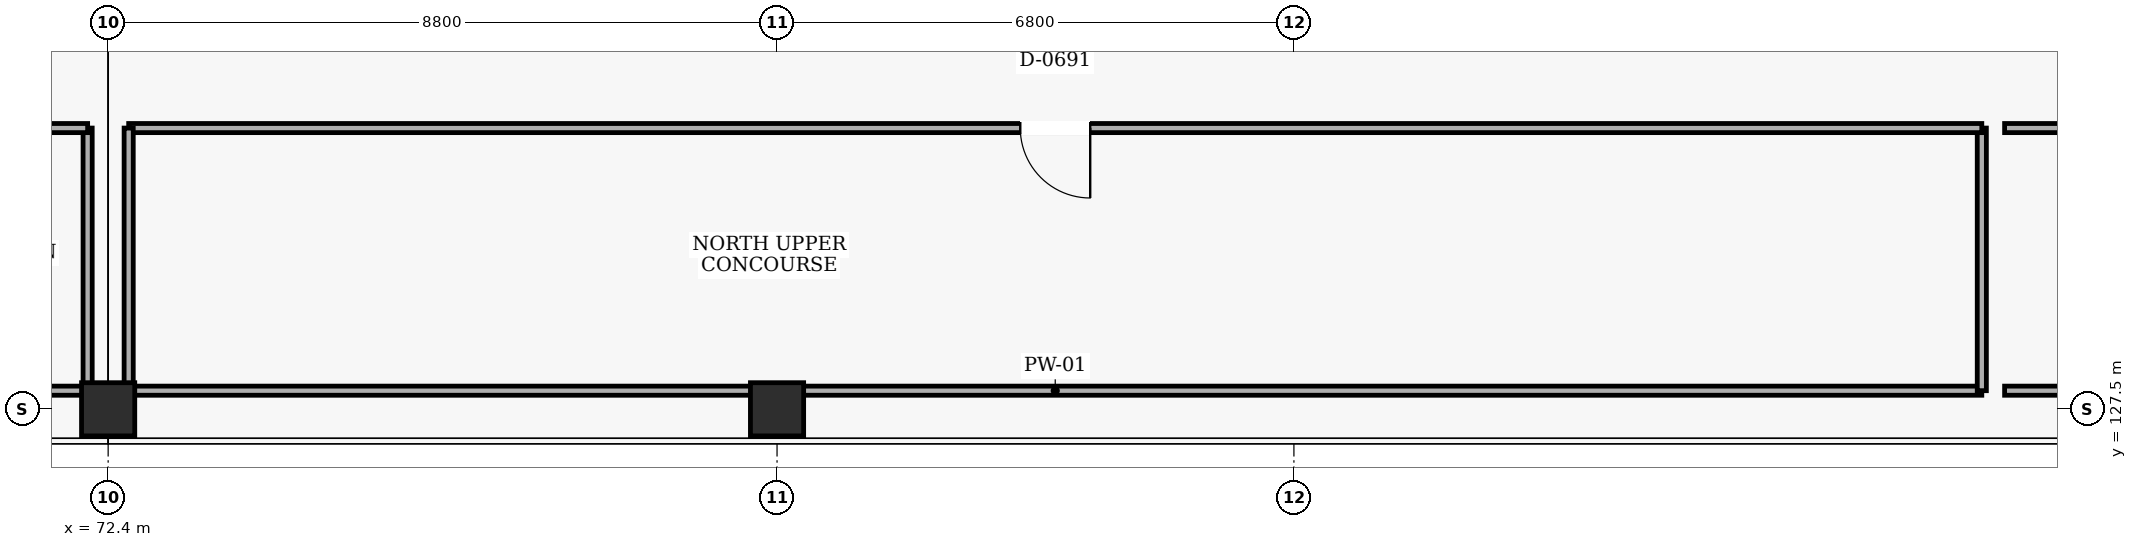
"""IFC4 building model, lengths in metres.
Left out: names, types, materials, properties, quantities, classifications, styles, units other than length and angle.
Written with IfcOpenShell. Run it as: python <this file> out.ifc"""

import sys

from ifc_helpers import new_model, si_unit, direction, frame, frame_2d, origin, origin_2d, place, context, subcontext, project, spatial, rectangle, extrude, element, fill, save


model = new_model("IFC4")
c1 = context("Model", 3, precision=1e-05, world=origin(), true_north=direction((0.0, 1.0)))
c2 = subcontext(c1, "Body", "Model", "MODEL_VIEW")
j1 = project(units=[si_unit("LENGTHUNIT", "METRE"), si_unit("PLANEANGLEUNIT", "RADIAN")], contexts=[c1])
p1 = place(None, origin())
s1 = spatial("IfcSite", under=j1, at=p1, CompositionType="ELEMENT")
p2 = place(p1, origin())
s2 = spatial("IfcBuilding", under=s1, at=p2, CompositionType="ELEMENT")
p3 = place(p2, frame((0.0, 0.0, 15.0)))
s3 = spatial("IfcBuildingStorey", under=s2, at=p3, CompositionType="ELEMENT", Elevation=15.0)
for number, where, z_axis, x_axis in (
    (1, (72.4, 127.5, 0.0), (0.0, 0.0, 1.0), (1.0, 0.0, 0.0)),
    (2, (81.2, 127.5, 0.0), (0.0, 0.0, 1.0), (1.0, 0.0, 0.0)),
):
    element("IfcColumn", number, at=place(p3, frame(where, z_axis=z_axis, x_axis=x_axis)), inside=s3, PredefinedType="COLUMN", context=c2, shape_type="SweptSolid", body=[
        extrude(rectangle(XDim=0.7, YDim=0.7, at=origin_2d()), origin(), (0.0, 0.0, 1.0), 4.8),
    ])
p4 = place(p3, frame((56.618, 127.745, 0.0), z_axis=(0.0, 0.0, 1.0), x_axis=(1.0, 0.0, 0.0)))
e3 = element("IfcWall", 3, at=p4, inside=s3, PredefinedType="PARTITIONING", context=c2, shape_type="SweptSolid", body=[
    extrude(rectangle(XDim=15.511, YDim=0.12, at=frame_2d((7.756, 0.0))), origin(), (0.0, 0.0, 1.0), 3.78),
])
p5 = place(p3, frame((72.13, 127.745, 0.0), z_axis=(0.0, 0.0, 1.0), x_axis=(0.0, 1.0, 0.0)))
e4 = element("IfcWall", 4, at=p5, inside=s3, PredefinedType="PARTITIONING", context=c2, shape_type="SweptSolid", body=[
    extrude(rectangle(XDim=3.455, YDim=0.12, at=frame_2d((1.728, 0.0))), origin(), (0.0, 0.0, 1.0), 3.78),
])
p6 = place(p3, frame((72.13, 131.2, 0.0), z_axis=(0.0, 0.0, 1.0), x_axis=(-1.0, 0.0, 0.0)))
e5 = element("IfcWall", 5, at=p6, inside=s3, PredefinedType="PARTITIONING", context=c2, shape_type="SweptSolid", body=[
    extrude(rectangle(XDim=15.511, YDim=0.12, at=frame_2d((7.756, 0.0))), origin(), (0.0, 0.0, 1.0), 4.5),
])
p7 = place(p6, frame((6.676, 0.0, 0.0)))
e6 = element("IfcOpeningElement", 6, at=p7, cuts=e5, PredefinedType="OPENING", context=c2, shape_type="SweptSolid", body=[
    extrude(rectangle(XDim=2.16, YDim=2.35, at=frame_2d((1.08, 1.175))), frame((0.0, 0.07, 0.0), z_axis=(0.0, -1.0, 0.0), x_axis=(1.0, 0.0, 0.0)), (0.0, 0.0, 1.0), 0.14),
])
p8 = place(p3, frame((72.67, 127.745, 0.0), z_axis=(0.0, 0.0, 1.0), x_axis=(1.0, 0.0, 0.0)))
e7 = element("IfcWall", 7, at=p8, inside=s3, PredefinedType="PARTITIONING", context=c2, shape_type="SweptSolid", body=[
    extrude(rectangle(XDim=24.38, YDim=0.12, at=frame_2d((12.19, 0.0))), origin(), (0.0, 0.0, 1.0), 3.78),
])
p9 = place(p3, frame((97.05, 127.745, 0.0), z_axis=(0.0, 0.0, 1.0), x_axis=(0.0, 1.0, 0.0)))
e8 = element("IfcWall", 8, at=p9, inside=s3, PredefinedType="PARTITIONING", context=c2, shape_type="SweptSolid", body=[
    extrude(rectangle(XDim=3.455, YDim=0.12, at=frame_2d((1.728, 0.0))), origin(), (0.0, 0.0, 1.0), 4.5),
])
p10 = place(p3, frame((97.05, 131.2, 0.0), z_axis=(0.0, 0.0, 1.0), x_axis=(-1.0, 0.0, 0.0)))
e9 = element("IfcWall", 9, at=p10, inside=s3, PredefinedType="PARTITIONING", context=c2, shape_type="SweptSolid", body=[
    extrude(rectangle(XDim=24.38, YDim=0.12, at=frame_2d((12.19, 0.0))), origin(), (0.0, 0.0, 1.0), 4.5),
])
p11 = place(p10, frame((11.73, 0.0, 0.0)))
e10 = element("IfcOpeningElement", 10, at=p11, cuts=e9, PredefinedType="OPENING", context=c2, shape_type="SweptSolid", body=[
    extrude(rectangle(XDim=0.92, YDim=2.1, at=frame_2d((0.46, 1.05))), frame((0.0, 0.07, 0.0), z_axis=(0.0, -1.0, 0.0), x_axis=(1.0, 0.0, 0.0)), (0.0, 0.0, 1.0), 0.14),
])
p12 = place(p3, frame((72.67, 131.2, 0.0), z_axis=(0.0, 0.0, 1.0), x_axis=(0.0, -1.0, 0.0)))
e11 = element("IfcWall", 11, at=p12, inside=s3, PredefinedType="PARTITIONING", context=c2, shape_type="SweptSolid", body=[
    extrude(rectangle(XDim=3.455, YDim=0.12, at=frame_2d((1.728, 0.0))), origin(), (0.0, 0.0, 1.0), 3.78),
])
p13 = place(p3, frame((97.35, 127.745, 0.0), z_axis=(0.0, 0.0, 1.0), x_axis=(1.0, 0.0, 0.0)))
e12 = element("IfcWall", 12, at=p13, inside=s3, PredefinedType="PARTITIONING", context=c2, shape_type="SweptSolid", body=[
    extrude(rectangle(XDim=24.38, YDim=0.12, at=frame_2d((12.19, 0.0))), origin(), (0.0, 0.0, 1.0), 4.5),
])
p14 = place(p3, frame((121.73, 131.2, 0.0), z_axis=(0.0, 0.0, 1.0), x_axis=(-1.0, 0.0, 0.0)))
e13 = element("IfcWall", 13, at=p14, inside=s3, PredefinedType="PARTITIONING", context=c2, shape_type="SweptSolid", body=[
    extrude(rectangle(XDim=24.38, YDim=0.12, at=frame_2d((12.19, 0.0))), origin(), (0.0, 0.0, 1.0), 4.5),
])
p15 = place(p14, frame((11.71, 0.0, 0.0)))
e14 = element("IfcOpeningElement", 14, at=p15, cuts=e13, PredefinedType="OPENING", context=c2, shape_type="SweptSolid", body=[
    extrude(rectangle(XDim=0.96, YDim=2.1, at=frame_2d((0.48, 1.05))), frame((0.0, 0.07, 0.0), z_axis=(0.0, -1.0, 0.0), x_axis=(1.0, 0.0, 0.0)), (0.0, 0.0, 1.0), 0.14),
])
p16 = place(p11, origin())
e15 = element("IfcDoor", 15, at=p16, inside=s3, OperationType="SINGLE_SWING_LEFT", PredefinedType="DOOR", context=c2, shape_type="SweptSolid", body=[
    extrude(rectangle(XDim=0.92, YDim=2.1, at=frame_2d((0.46, 1.05))), frame((0.0, 0.025, 0.0), z_axis=(0.0, -1.0, 0.0), x_axis=(1.0, 0.0, 0.0)), (0.0, 0.0, 1.0), 0.05),
])
fill(e10, e15)
save(model, sys.argv[1])
